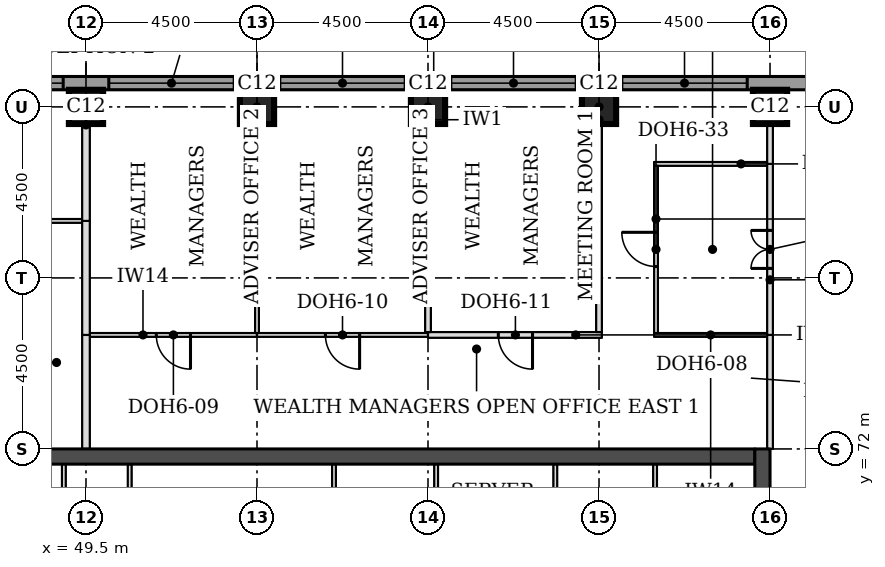
"""IFC4 building model, lengths in metres.
Left out: names, types, materials, properties, quantities, classifications, styles, units other than length and angle.
Written with IfcOpenShell. Run it as: python <this file> out.ifc"""

import sys

from ifc_helpers import new_model, si_unit, direction, frame, frame_2d, origin, origin_2d, place, context, subcontext, project, spatial, rectangle, extrude, element, fill, save


model = new_model("IFC4")
c1 = context("Model", 3, precision=1e-05, world=origin(), true_north=direction((0.0, 1.0)))
c2 = subcontext(c1, "Body", "Model", "MODEL_VIEW")
j1 = project(units=[si_unit("LENGTHUNIT", "METRE"), si_unit("PLANEANGLEUNIT", "RADIAN")], contexts=[c1])
p1 = place(None, origin())
s1 = spatial("IfcSite", under=j1, at=p1, CompositionType="ELEMENT")
p2 = place(p1, origin())
s2 = spatial("IfcBuilding", under=s1, at=p2, CompositionType="ELEMENT")
p3 = place(p2, frame((0.0, 0.0, 184.7)))
s3 = spatial("IfcBuildingStorey", under=s2, at=p3, CompositionType="ELEMENT", Elevation=184.7)
for number, where, z_axis, x_axis in (
    (1, (49.5, 81.0, 0.0), (0.0, 0.0, 1.0), (1.0, 0.0, 0.0)),
    (2, (54.0, 81.0, 0.0), (0.0, 0.0, 1.0), (1.0, 0.0, 0.0)),
    (3, (58.5, 81.0, 0.0), (0.0, 0.0, 1.0), (1.0, 0.0, 0.0)),
    (4, (63.0, 81.0, 0.0), (0.0, 0.0, 1.0), (1.0, 0.0, 0.0)),
    (5, (67.5, 81.0, 0.0), (0.0, 0.0, 1.0), (1.0, 0.0, 0.0)),
):
    element("IfcColumn", number, at=place(p3, frame(where, z_axis=z_axis, x_axis=x_axis)), inside=s3, PredefinedType="COLUMN", context=c2, shape_type="SweptSolid", body=[
        extrude(rectangle(XDim=0.9, YDim=0.9, at=origin_2d()), origin(), (0.0, 0.0, 1.0), 3.7),
    ])
p4 = place(p3, frame((45.4, 71.8, 0.0), z_axis=(0.0, 0.0, 1.0), x_axis=(1.0, 0.0, 0.0)))
e6 = element("IfcWall", 6, at=p4, inside=s3, PredefinedType="SHEAR", context=c2, shape_type="SweptSolid", body=[
    extrude(rectangle(XDim=21.7, YDim=0.4, at=frame_2d((10.85, 0.0))), origin(), (0.0, 0.0, 1.0), 3.7),
])
p5 = place(p3, frame((67.3, 49.5, 0.0), z_axis=(0.0, 0.0, 1.0), x_axis=(0.0, 1.0, 0.0)))
e7 = element("IfcWall", 7, at=p5, inside=s3, PredefinedType="SHEAR", context=c2, shape_type="SweptSolid", body=[
    extrude(rectangle(XDim=22.5, YDim=0.4, at=frame_2d((11.25, 0.0))), origin(), (0.0, 0.0, 1.0), 3.7),
])
p6 = place(p5, frame((4.2, 0.0, 0.0)))
e8 = element("IfcOpeningElement", 8, at=p6, cuts=e7, PredefinedType="OPENING", context=c2, shape_type="SweptSolid", body=[
    extrude(rectangle(XDim=1.8, YDim=2.1, at=frame_2d((0.9, 1.05))), frame((0.0, 0.21, 0.0), z_axis=(0.0, -1.0, 0.0), x_axis=(1.0, 0.0, 0.0)), (0.0, 0.0, 1.0), 0.42),
])
p7 = place(p5, frame((6.9, 0.0, 0.0)))
e9 = element("IfcOpeningElement", 9, at=p7, cuts=e7, PredefinedType="OPENING", context=c2, shape_type="SweptSolid", body=[
    extrude(rectangle(XDim=1.1, YDim=2.1, at=frame_2d((0.55, 1.05))), frame((0.0, 0.21, 0.0), z_axis=(0.0, -1.0, 0.0), x_axis=(1.0, 0.0, 0.0)), (0.0, 0.0, 1.0), 0.42),
])
p8 = place(p5, frame((13.6, 0.0, 0.0)))
e10 = element("IfcOpeningElement", 10, at=p8, cuts=e7, PredefinedType="OPENING", context=c2, shape_type="SweptSolid", body=[
    extrude(rectangle(XDim=1.1, YDim=2.1, at=frame_2d((0.55, 1.05))), frame((0.0, 0.21, 0.0), z_axis=(0.0, -1.0, 0.0), x_axis=(1.0, 0.0, 0.0)), (0.0, 0.0, 1.0), 0.42),
])
p9 = place(p5, frame((16.5, 0.0, 0.0)))
e11 = element("IfcOpeningElement", 11, at=p9, cuts=e7, PredefinedType="OPENING", context=c2, shape_type="SweptSolid", body=[
    extrude(rectangle(XDim=1.8, YDim=2.1, at=frame_2d((0.9, 1.05))), frame((0.0, 0.21, 0.0), z_axis=(0.0, -1.0, 0.0), x_axis=(1.0, 0.0, 0.0)), (0.0, 0.0, 1.0), 0.42),
])
p10 = place(p3, frame((72.331, 81.625, 0.0), z_axis=(0.0, 0.0, 1.0), x_axis=(-1.0, 0.0, 0.0)))
e12 = element("IfcWall", 12, at=p10, inside=s3, PredefinedType="STANDARD", context=c2, shape_type="SweptSolid", body=[
    extrude(rectangle(XDim=32.163, YDim=0.35, at=frame_2d((16.081, 0.0))), origin(), (0.0, 0.0, 1.0), 3.525),
])
p11 = place(p10, frame((5.431, 0.0, 0.9)))
e13 = element("IfcOpeningElement", 13, at=p11, cuts=e12, PredefinedType="OPENING", context=c2, shape_type="SweptSolid", body=[
    extrude(rectangle(XDim=3.3, YDim=1.9, at=frame_2d((1.65, 0.95))), frame((0.0, 0.185, 0.0), z_axis=(0.0, -1.0, 0.0), x_axis=(1.0, 0.0, 0.0)), (0.0, 0.0, 1.0), 0.37),
])
p12 = place(p10, frame((9.931, 0.0, 0.9)))
e14 = element("IfcOpeningElement", 14, at=p12, cuts=e12, PredefinedType="OPENING", context=c2, shape_type="SweptSolid", body=[
    extrude(rectangle(XDim=3.3, YDim=1.9, at=frame_2d((1.65, 0.95))), frame((0.0, 0.185, 0.0), z_axis=(0.0, -1.0, 0.0), x_axis=(1.0, 0.0, 0.0)), (0.0, 0.0, 1.0), 0.37),
])
p13 = place(p10, frame((14.431, 0.0, 0.9)))
e15 = element("IfcOpeningElement", 15, at=p13, cuts=e12, PredefinedType="OPENING", context=c2, shape_type="SweptSolid", body=[
    extrude(rectangle(XDim=3.3, YDim=1.9, at=frame_2d((1.65, 0.95))), frame((0.0, 0.185, 0.0), z_axis=(0.0, -1.0, 0.0), x_axis=(1.0, 0.0, 0.0)), (0.0, 0.0, 1.0), 0.37),
])
p14 = place(p10, frame((18.931, 0.0, 0.9)))
e16 = element("IfcOpeningElement", 16, at=p14, cuts=e12, PredefinedType="OPENING", context=c2, shape_type="SweptSolid", body=[
    extrude(rectangle(XDim=3.3, YDim=1.9, at=frame_2d((1.65, 0.95))), frame((0.0, 0.185, 0.0), z_axis=(0.0, -1.0, 0.0), x_axis=(1.0, 0.0, 0.0)), (0.0, 0.0, 1.0), 0.37),
])
p15 = place(p10, frame((23.431, 0.0, 0.9)))
e17 = element("IfcOpeningElement", 17, at=p15, cuts=e12, PredefinedType="OPENING", context=c2, shape_type="SweptSolid", body=[
    extrude(rectangle(XDim=3.3, YDim=1.9, at=frame_2d((1.65, 0.95))), frame((0.0, 0.185, 0.0), z_axis=(0.0, -1.0, 0.0), x_axis=(1.0, 0.0, 0.0)), (0.0, 0.0, 1.0), 0.37),
])
p16 = place(p3, frame((49.6, 75.0, 0.0), z_axis=(0.0, 0.0, 1.0), x_axis=(1.0, 0.0, 0.0)))
e18 = element("IfcWall", 18, at=p16, inside=s3, PredefinedType="PARTITIONING", context=c2, shape_type="SweptSolid", body=[
    extrude(rectangle(XDim=4.4, YDim=0.1, at=frame_2d((2.2, 0.0))), origin(), (0.0, 0.0, 1.0), 3.55),
])
p17 = place(p16, frame((1.75, 0.0, 0.0)))
e19 = element("IfcOpeningElement", 19, at=p17, cuts=e18, PredefinedType="OPENING", context=c2, shape_type="SweptSolid", body=[
    extrude(rectangle(XDim=0.9, YDim=2.1, at=frame_2d((0.45, 1.05))), frame((0.0, 0.06, 0.0), z_axis=(0.0, -1.0, 0.0), x_axis=(1.0, 0.0, 0.0)), (0.0, 0.0, 1.0), 0.12),
])
p18 = place(p3, frame((54.0, 75.0, 0.0), z_axis=(0.0, 0.0, 1.0), x_axis=(1.0, 0.0, 0.0)))
e20 = element("IfcWall", 20, at=p18, inside=s3, PredefinedType="PARTITIONING", context=c2, shape_type="SweptSolid", body=[
    extrude(rectangle(XDim=4.5, YDim=0.1, at=frame_2d((2.25, 0.0))), origin(), (0.0, 0.0, 1.0), 3.55),
])
p19 = place(p18, frame((1.8, 0.0, 0.0)))
e21 = element("IfcOpeningElement", 21, at=p19, cuts=e20, PredefinedType="OPENING", context=c2, shape_type="SweptSolid", body=[
    extrude(rectangle(XDim=0.9, YDim=2.1, at=frame_2d((0.45, 1.05))), frame((0.0, 0.06, 0.0), z_axis=(0.0, -1.0, 0.0), x_axis=(1.0, 0.0, 0.0)), (0.0, 0.0, 1.0), 0.12),
])
p20 = place(p3, frame((58.5, 75.0, 0.0), z_axis=(0.0, 0.0, 1.0), x_axis=(1.0, 0.0, 0.0)))
e22 = element("IfcWall", 22, at=p20, inside=s3, PredefinedType="PARTITIONING", context=c2, shape_type="SweptSolid", body=[
    extrude(rectangle(XDim=4.575, YDim=0.15, at=frame_2d((2.288, 0.0))), origin(), (0.0, 0.0, 1.0), 3.55),
])
p21 = place(p20, frame((1.85, 0.0, 0.0)))
e23 = element("IfcOpeningElement", 23, at=p21, cuts=e22, PredefinedType="OPENING", context=c2, shape_type="SweptSolid", body=[
    extrude(rectangle(XDim=0.9, YDim=2.1, at=frame_2d((0.45, 1.05))), frame((0.0, 0.085, 0.0), z_axis=(0.0, -1.0, 0.0), x_axis=(1.0, 0.0, 0.0)), (0.0, 0.0, 1.0), 0.17),
])
p22 = place(p3, frame((64.45, 75.0, 0.0), z_axis=(0.0, 0.0, 1.0), x_axis=(1.0, 0.0, 0.0)))
e24 = element("IfcWall", 24, at=p22, inside=s3, PredefinedType="PARTITIONING", context=c2, shape_type="SweptSolid", body=[
    extrude(rectangle(XDim=2.975, YDim=0.1, at=frame_2d((1.488, 0.0))), origin(), (0.0, 0.0, 1.0), 3.55),
])
p23 = place(p3, frame((45.075, 78.0, 0.0), z_axis=(0.0, 0.0, 1.0), x_axis=(1.0, 0.0, 0.0)))
e25 = element("IfcWall", 25, at=p23, inside=s3, PredefinedType="PARTITIONING", context=c2, shape_type="SweptSolid", body=[
    extrude(rectangle(XDim=4.325, YDim=0.1, at=frame_2d((2.163, 0.0))), origin(), (0.0, 0.0, 1.0), 3.55),
])
p24 = place(p23, frame((1.95, 0.0, 0.0)))
e26 = element("IfcOpeningElement", 26, at=p24, cuts=e25, PredefinedType="OPENING", context=c2, shape_type="SweptSolid", body=[
    extrude(rectangle(XDim=0.9, YDim=2.1, at=frame_2d((0.45, 1.05))), frame((0.0, 0.06, 0.0), z_axis=(0.0, -1.0, 0.0), x_axis=(1.0, 0.0, 0.0)), (0.0, 0.0, 1.0), 0.12),
])
p25 = place(p3, frame((64.45, 79.5, 0.0), z_axis=(0.0, 0.0, 1.0), x_axis=(1.0, 0.0, 0.0)))
e27 = element("IfcWall", 27, at=p25, inside=s3, PredefinedType="PARTITIONING", context=c2, shape_type="SweptSolid", body=[
    extrude(rectangle(XDim=2.975, YDim=0.1, at=frame_2d((1.488, 0.0))), origin(), (0.0, 0.0, 1.0), 3.55),
])
p26 = place(p3, frame((49.5, 72.0, 0.0), z_axis=(0.0, 0.0, 1.0), x_axis=(0.0, 1.0, 0.0)))
e28 = element("IfcWall", 28, at=p26, inside=s3, PredefinedType="PARTITIONING", context=c2, shape_type="SweptSolid", body=[
    extrude(rectangle(XDim=3.0, YDim=0.2, at=frame_2d((1.5, 0.0))), origin(), (0.0, 0.0, 1.0), 3.55),
])
p27 = place(p3, frame((67.5, 72.0, 0.0), z_axis=(0.0, 0.0, 1.0), x_axis=(0.0, 1.0, 0.0)))
e29 = element("IfcWall", 29, at=p27, inside=s3, PredefinedType="PARTITIONING", context=c2, shape_type="SweptSolid", body=[
    extrude(rectangle(XDim=3.0, YDim=0.15, at=frame_2d((1.5, 0.0))), origin(), (0.0, 0.0, 1.0), 3.022),
])
p28 = place(p3, frame((49.5, 75.0, 0.0), z_axis=(0.0, 0.0, 1.0), x_axis=(0.0, 1.0, 0.0)))
e30 = element("IfcWall", 30, at=p28, inside=s3, PredefinedType="PARTITIONING", context=c2, shape_type="SweptSolid", body=[
    extrude(rectangle(XDim=3.0, YDim=0.2, at=frame_2d((1.5, 0.0))), origin(), (0.0, 0.0, 1.0), 3.55),
])
p29 = place(p3, frame((67.5, 75.0, 0.0), z_axis=(0.0, 0.0, 1.0), x_axis=(0.0, 1.0, 0.0)))
e31 = element("IfcWall", 31, at=p29, inside=s3, PredefinedType="PARTITIONING", context=c2, shape_type="SweptSolid", body=[
    extrude(rectangle(XDim=4.5, YDim=0.15, at=frame_2d((2.25, 0.0))), origin(), (0.0, 0.0, 1.0), 3.022),
])
p30 = place(p29, frame((1.75, 0.0, 0.0)))
e32 = element("IfcOpeningElement", 32, at=p30, cuts=e31, PredefinedType="OPENING", context=c2, shape_type="SweptSolid", body=[
    extrude(rectangle(XDim=1.0, YDim=2.1, at=frame_2d((0.5, 1.05))), frame((0.0, 0.085, 0.0), z_axis=(0.0, -1.0, 0.0), x_axis=(1.0, 0.0, 0.0)), (0.0, 0.0, 1.0), 0.17),
])
p31 = place(p3, frame((54.0, 75.05, 0.0), z_axis=(0.0, 0.0, 1.0), x_axis=(0.0, 1.0, 0.0)))
e33 = element("IfcWall", 33, at=p31, inside=s3, PredefinedType="PARTITIONING", context=c2, shape_type="SweptSolid", body=[
    extrude(rectangle(XDim=6.4, YDim=0.1, at=frame_2d((3.2, 0.0))), origin(), (0.0, 0.0, 1.0), 3.55),
])
p32 = place(p3, frame((64.5, 75.05, 0.0), z_axis=(0.0, 0.0, 1.0), x_axis=(0.0, 1.0, 0.0)))
e34 = element("IfcWall", 34, at=p32, inside=s3, PredefinedType="PARTITIONING", context=c2, shape_type="SweptSolid", body=[
    extrude(rectangle(XDim=4.4, YDim=0.1, at=frame_2d((2.2, 0.0))), origin(), (0.0, 0.0, 1.0), 3.55),
])
p33 = place(p32, frame((1.75, 0.0, 0.0)))
e35 = element("IfcOpeningElement", 35, at=p33, cuts=e34, PredefinedType="OPENING", context=c2, shape_type="SweptSolid", body=[
    extrude(rectangle(XDim=0.9, YDim=2.1, at=frame_2d((0.45, 1.05))), frame((0.0, 0.06, 0.0), z_axis=(0.0, -1.0, 0.0), x_axis=(1.0, 0.0, 0.0)), (0.0, 0.0, 1.0), 0.12),
])
for number, where, z_axis, x_axis in (
    (36, (58.5, 75.075, 0.0), (0.0, 0.0, 1.0), (0.0, 1.0, 0.0)),
    (37, (63.0, 75.075, 0.0), (0.0, 0.0, 1.0), (0.0, 1.0, 0.0)),
):
    element("IfcWall", number, at=place(p3, frame(where, z_axis=z_axis, x_axis=x_axis)), inside=s3, PredefinedType="PARTITIONING", context=c2, shape_type="SweptSolid", body=[
        extrude(rectangle(XDim=6.375, YDim=0.15, at=frame_2d((3.188, 0.0))), origin(), (0.0, 0.0, 1.0), 3.55),
    ])
p34 = place(p3, frame((49.5, 78.0, 0.0), z_axis=(0.0, 0.0, 1.0), x_axis=(0.0, 1.0, 0.0)))
e38 = element("IfcWall", 38, at=p34, inside=s3, PredefinedType="PARTITIONING", context=c2, shape_type="SweptSolid", body=[
    extrude(rectangle(XDim=3.45, YDim=0.2, at=frame_2d((1.725, 0.0))), origin(), (0.0, 0.0, 1.0), 3.55),
])
p35 = place(p3, frame((67.5, 79.5, 0.0), z_axis=(0.0, 0.0, 1.0), x_axis=(0.0, 1.0, 0.0)))
e39 = element("IfcWall", 39, at=p35, inside=s3, PredefinedType="PARTITIONING", context=c2, shape_type="SweptSolid", body=[
    extrude(rectangle(XDim=1.95, YDim=0.15, at=frame_2d((0.975, 0.0))), origin(), (0.0, 0.0, 1.0), 3.022),
])
for number, where, z_axis, x_axis in (
    (40, (48.917, 68.5, 0.0), (0.0, 0.0, 1.0), (0.0, 1.0, 0.0)),
    (41, (50.65, 68.5, 0.0), (0.0, 0.0, 1.0), (0.0, 1.0, 0.0)),
    (42, (56.026, 68.5, 0.0), (0.0, 0.0, 1.0), (0.0, 1.0, 0.0)),
    (43, (58.714, 68.5, 0.0), (0.0, 0.0, 1.0), (0.0, 1.0, 0.0)),
    (44, (61.85, 68.5, 0.0), (0.0, 0.0, 1.0), (0.0, 1.0, 0.0)),
    (45, (64.475, 68.5, 0.0), (0.0, 0.0, 1.0), (0.0, 1.0, 0.0)),
):
    element("IfcWall", number, at=place(p3, frame(where, z_axis=z_axis, x_axis=x_axis)), inside=s3, PredefinedType="PARTITIONING", context=c2, shape_type="SweptSolid", body=[
        extrude(rectangle(XDim=3.1, YDim=0.1, at=frame_2d((1.55, 0.0))), origin(), (0.0, 0.0, 1.0), 3.55),
    ])
p36 = place(p11, origin())
e46 = element("IfcWindow", 46, at=p36, inside=s3, PartitioningType="SINGLE_PANEL", PredefinedType="WINDOW", context=c2, shape_type="SweptSolid", body=[
    extrude(rectangle(XDim=3.3, YDim=1.9, at=frame_2d((1.65, 0.95))), frame((0.0, 0.085, 0.0), z_axis=(0.0, -1.0, 0.0), x_axis=(1.0, 0.0, 0.0)), (0.0, 0.0, 1.0), 0.06),
])
fill(e13, e46)
p37 = place(p12, origin())
e47 = element("IfcWindow", 47, at=p37, inside=s3, PartitioningType="SINGLE_PANEL", PredefinedType="WINDOW", context=c2, shape_type="SweptSolid", body=[
    extrude(rectangle(XDim=3.3, YDim=1.9, at=frame_2d((1.65, 0.95))), frame((0.0, 0.085, 0.0), z_axis=(0.0, -1.0, 0.0), x_axis=(1.0, 0.0, 0.0)), (0.0, 0.0, 1.0), 0.06),
])
fill(e14, e47)
p38 = place(p13, origin())
e48 = element("IfcWindow", 48, at=p38, inside=s3, PartitioningType="SINGLE_PANEL", PredefinedType="WINDOW", context=c2, shape_type="SweptSolid", body=[
    extrude(rectangle(XDim=3.3, YDim=1.9, at=frame_2d((1.65, 0.95))), frame((0.0, 0.085, 0.0), z_axis=(0.0, -1.0, 0.0), x_axis=(1.0, 0.0, 0.0)), (0.0, 0.0, 1.0), 0.06),
])
fill(e15, e48)
p39 = place(p14, origin())
e49 = element("IfcWindow", 49, at=p39, inside=s3, PartitioningType="SINGLE_PANEL", PredefinedType="WINDOW", context=c2, shape_type="SweptSolid", body=[
    extrude(rectangle(XDim=3.3, YDim=1.9, at=frame_2d((1.65, 0.95))), frame((0.0, 0.085, 0.0), z_axis=(0.0, -1.0, 0.0), x_axis=(1.0, 0.0, 0.0)), (0.0, 0.0, 1.0), 0.06),
])
fill(e16, e49)
p40 = place(p15, origin())
e50 = element("IfcWindow", 50, at=p40, inside=s3, PartitioningType="SINGLE_PANEL", PredefinedType="WINDOW", context=c2, shape_type="SweptSolid", body=[
    extrude(rectangle(XDim=3.3, YDim=1.9, at=frame_2d((1.65, 0.95))), frame((0.0, 0.085, 0.0), z_axis=(0.0, -1.0, 0.0), x_axis=(1.0, 0.0, 0.0)), (0.0, 0.0, 1.0), 0.06),
])
fill(e17, e50)
p41 = place(p30, origin())
e51 = element("IfcDoor", 51, at=p41, inside=s3, OperationType="DOUBLE_DOOR_SINGLE_SWING", PredefinedType="DOOR", context=c2, shape_type="SweptSolid", body=[
    extrude(rectangle(XDim=1.0, YDim=2.1, at=frame_2d((0.5, 1.05))), frame((0.0, 0.025, 0.0), z_axis=(0.0, -1.0, 0.0), x_axis=(1.0, 0.0, 0.0)), (0.0, 0.0, 1.0), 0.05),
])
fill(e32, e51)
p42 = place(p33, origin())
e52 = element("IfcDoor", 52, at=p42, inside=s3, OperationType="SINGLE_SWING_RIGHT", PredefinedType="DOOR", context=c2, shape_type="SweptSolid", body=[
    extrude(rectangle(XDim=0.9, YDim=2.1, at=frame_2d((0.45, 1.05))), frame((0.0, 0.025, 0.0), z_axis=(0.0, -1.0, 0.0), x_axis=(1.0, 0.0, 0.0)), (0.0, 0.0, 1.0), 0.05),
])
fill(e35, e52)
p43 = place(p17, frame((0.9, 0.0, 0.0), z_axis=(0.0, 0.0, 1.0), x_axis=(-1.0, 0.0, 0.0)))
e53 = element("IfcDoor", 53, at=p43, inside=s3, OperationType="SINGLE_SWING_LEFT", PredefinedType="DOOR", context=c2, shape_type="SweptSolid", body=[
    extrude(rectangle(XDim=0.9, YDim=2.1, at=frame_2d((0.45, 1.05))), frame((0.0, 0.025, 0.0), z_axis=(0.0, -1.0, 0.0), x_axis=(1.0, 0.0, 0.0)), (0.0, 0.0, 1.0), 0.05),
])
fill(e19, e53)
p44 = place(p19, frame((0.9, 0.0, 0.0), z_axis=(0.0, 0.0, 1.0), x_axis=(-1.0, 0.0, 0.0)))
e54 = element("IfcDoor", 54, at=p44, inside=s3, OperationType="SINGLE_SWING_LEFT", PredefinedType="DOOR", context=c2, shape_type="SweptSolid", body=[
    extrude(rectangle(XDim=0.9, YDim=2.1, at=frame_2d((0.45, 1.05))), frame((0.0, 0.025, 0.0), z_axis=(0.0, -1.0, 0.0), x_axis=(1.0, 0.0, 0.0)), (0.0, 0.0, 1.0), 0.05),
])
fill(e21, e54)
p45 = place(p21, frame((0.9, 0.0, 0.0), z_axis=(0.0, 0.0, 1.0), x_axis=(-1.0, 0.0, 0.0)))
e55 = element("IfcDoor", 55, at=p45, inside=s3, OperationType="SINGLE_SWING_LEFT", PredefinedType="DOOR", context=c2, shape_type="SweptSolid", body=[
    extrude(rectangle(XDim=0.9, YDim=2.1, at=frame_2d((0.45, 1.05))), frame((0.0, 0.025, 0.0), z_axis=(0.0, -1.0, 0.0), x_axis=(1.0, 0.0, 0.0)), (0.0, 0.0, 1.0), 0.05),
])
fill(e23, e55)
save(model, sys.argv[1])
